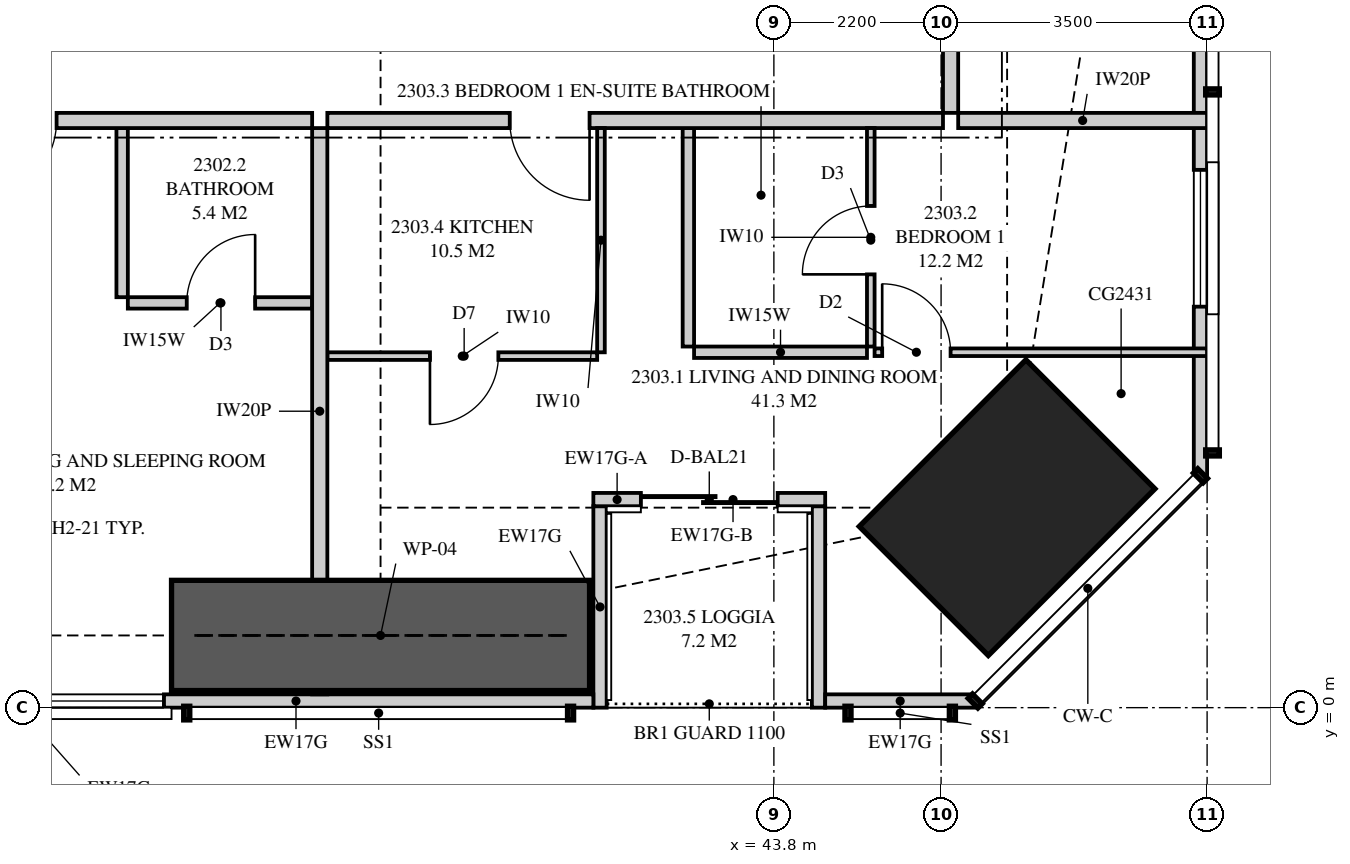
"""IFC4 building model, lengths in metres.
Left out: names, types, materials, properties, quantities, classifications, styles, units other than length and angle.
Written with IfcOpenShell. Run it as: python <this file> out.ifc"""

import sys

from ifc_helpers import new_model, si_unit, direction, frame, frame_2d, origin, origin_2d, place, context, subcontext, project, spatial, polyline, rectangle, hollow_rectangle, outline, extrude, element, fill, save


model = new_model("IFC4")
c1 = context("Model", 3, precision=1e-05, world=origin(), true_north=direction((0.0, 1.0)))
c2 = subcontext(c1, "Body", "Model", "MODEL_VIEW")
j1 = project(units=[si_unit("LENGTHUNIT", "METRE"), si_unit("PLANEANGLEUNIT", "RADIAN")], contexts=[c1])
p1 = place(None, origin())
s1 = spatial("IfcSite", under=j1, at=p1, CompositionType="ELEMENT")
p2 = place(p1, origin())
s2 = spatial("IfcBuilding", under=s1, at=p2, CompositionType="ELEMENT")
p3 = place(p2, frame((0.0, 0.0, 88.1)))
s3 = spatial("IfcBuildingStorey", under=s2, at=p3, CompositionType="ELEMENT", Elevation=88.1)
p4 = place(p3, frame((46.869, 2.631, 0.0), z_axis=(0.0, 0.0, 1.0), x_axis=(-0.707106781187, 0.707106781187, 0.0)))
e1 = element("IfcColumn", 1, at=p4, inside=s3, PredefinedType="COLUMN", context=c2, shape_type="SweptSolid", body=[
    extrude(hollow_rectangle(XDim=2.4, YDim=3.1, WallThickness=0.15, at=origin_2d()), origin(), (0.0, 0.0, 1.0), 3.35),
])
p5 = place(p3, frame((33.6, 0.087, 0.0), z_axis=(0.0, 0.0, 1.0), x_axis=(1.0, 0.0, 0.0)))
e2 = element("IfcWall", 2, at=p5, inside=s3, PredefinedType="SOLIDWALL", context=c2, shape_type="SweptSolid", body=[
    extrude(outline(polyline([(0.0, 0.0), (7.825, 0.0), (7.825, 3.11), (5.228, 3.11), (5.228, 2.15), (5.183, 2.15), (5.183, 3.11), (5.025, 3.11), (5.025, 2.15), (0.0, 2.15), (0.0, 0.0)])), frame((0.0, 0.087, 0.0), z_axis=(0.0, -1.0, 0.0), x_axis=(1.0, 0.0, 0.0)), (0.0, 0.0, 1.0), 0.175),
])
p6 = place(p5, frame((0.375, 0.0, 0.4)))
e3 = element("IfcOpeningElement", 3, at=p6, cuts=e2, PredefinedType="OPENING", context=c2, shape_type="SweptSolid", body=[
    extrude(rectangle(XDim=1.8, YDim=1.7, at=frame_2d((0.9, 0.85))), frame((0.0, 0.097, 0.0), z_axis=(0.0, -1.0, 0.0), x_axis=(1.0, 0.0, 0.0)), (0.0, 0.0, 1.0), 0.195),
])
p7 = place(p3, frame((44.475, 0.087, 0.0), z_axis=(0.0, 0.0, 1.0), x_axis=(1.0, 0.0, 0.0)))
e4 = element("IfcWall", 4, at=p7, inside=s3, PredefinedType="SOLIDWALL", context=c2, shape_type="SweptSolid", body=[
    extrude(rectangle(XDim=1.974, YDim=0.175, at=frame_2d((0.987, 0.0))), origin(), (0.0, 0.0, 1.0), 3.11),
])
p8 = place(p3, frame((41.425, 2.738, 0.0), z_axis=(0.0, 0.0, 1.0), x_axis=(1.0, 0.0, 0.0)))
e5 = element("IfcWall", 5, at=p8, inside=s3, PredefinedType="SOLIDWALL", context=c2, shape_type="SweptSolid", body=[
    extrude(rectangle(XDim=0.625, YDim=0.175, at=frame_2d((0.312, 0.0))), origin(), (0.0, 0.0, 1.0), 2.51),
])
p9 = place(p3, frame((42.05, 2.738, 0.0), z_axis=(0.0, 0.0, 1.0), x_axis=(1.0, 0.0, 0.0)))
e6 = element("IfcWall", 6, at=p9, inside=s3, PredefinedType="SOLIDWALL", context=c2, shape_type="SweptSolid", body=[
    extrude(rectangle(XDim=2.425, YDim=0.175, at=frame_2d((1.212, 0.0))), origin(), (0.0, 0.0, 1.0), 2.15),
])
p10 = place(p9, origin())
e7 = element("IfcOpeningElement", 7, at=p10, cuts=e6, PredefinedType="OPENING", context=c2, shape_type="SweptSolid", body=[
    extrude(rectangle(XDim=1.8, YDim=2.1, at=frame_2d((0.9, 1.05))), frame((0.0, 0.097, 0.0), z_axis=(0.0, -1.0, 0.0), x_axis=(1.0, 0.0, 0.0)), (0.0, 0.0, 1.0), 0.195),
])
p11 = place(p3, frame((41.512, 0.0, 0.0), z_axis=(0.0, 0.0, 1.0), x_axis=(0.0, 1.0, 0.0)))
e8 = element("IfcWall", 8, at=p11, inside=s3, PredefinedType="SOLIDWALL", context=c2, shape_type="SweptSolid", body=[
    extrude(outline(polyline([(0.0, 0.0), (2.65, 0.0), (2.65, 2.51), (2.373, 2.51), (2.373, 2.15), (0.705, 2.15), (0.705, 3.11), (0.0, 3.11), (0.0, 0.0)])), frame((0.0, 0.087, 0.0), z_axis=(0.0, -1.0, 0.0), x_axis=(1.0, 0.0, 0.0)), (0.0, 0.0, 1.0), 0.175),
])
p12 = place(p3, frame((44.387, 0.0, 0.0), z_axis=(0.0, 0.0, 1.0), x_axis=(0.0, 1.0, 0.0)))
e9 = element("IfcWall", 9, at=p12, inside=s3, PredefinedType="SOLIDWALL", context=c2, shape_type="SweptSolid", body=[
    extrude(outline(polyline([(0.0, 0.0), (2.65, 0.0), (2.65, 2.15), (1.291, 2.15), (1.291, 3.11), (0.0, 3.11), (0.0, 0.0)])), frame((0.0, 0.087, 0.0), z_axis=(0.0, -1.0, 0.0), x_axis=(1.0, 0.0, 0.0)), (0.0, 0.0, 1.0), 0.175),
])
p13 = place(p3, frame((49.413, 3.051, 0.0), z_axis=(0.0, 0.0, 1.0), x_axis=(0.0, 1.0, 0.0)))
e10 = element("IfcWall", 10, at=p13, inside=s3, PredefinedType="SOLIDWALL", context=c2, shape_type="SweptSolid", body=[
    extrude(outline(polyline([(0.0, 0.0), (31.897, 0.0), (31.897, 3.11), (22.167, 3.11), (22.167, 2.15), (22.074, 2.15), (22.074, 3.11), (21.949, 3.11), (21.949, 2.15), (9.949, 2.15), (9.949, 3.11), (9.823, 3.11), (9.823, 2.15), (9.73, 2.15), (9.73, 3.11), (0.0, 3.11), (0.0, 0.0)])), frame((0.0, 0.087, 0.0), z_axis=(0.0, -1.0, 0.0), x_axis=(1.0, 0.0, 0.0)), (0.0, 0.0, 1.0), 0.175),
])
p14 = place(p13, frame((2.224, 0.0, 0.4)))
e11 = element("IfcOpeningElement", 11, at=p14, cuts=e10, PredefinedType="OPENING", context=c2, shape_type="SweptSolid", body=[
    extrude(rectangle(XDim=1.8, YDim=1.7, at=frame_2d((0.9, 0.85))), frame((0.0, 0.097, 0.0), z_axis=(0.0, -1.0, 0.0), x_axis=(1.0, 0.0, 0.0)), (0.0, 0.0, 1.0), 0.195),
])
p15 = place(p13, frame((14.849, 0.0, 0.4)))
e12 = element("IfcOpeningElement", 12, at=p15, cuts=e10, PredefinedType="OPENING", context=c2, shape_type="SweptSolid", body=[
    extrude(rectangle(XDim=1.2, YDim=1.7, at=frame_2d((0.6, 0.85))), frame((0.0, 0.097, 0.0), z_axis=(0.0, -1.0, 0.0), x_axis=(1.0, 0.0, 0.0)), (0.0, 0.0, 1.0), 0.195),
])
p16 = place(p13, frame((27.373, 0.0, 0.4)))
e13 = element("IfcOpeningElement", 13, at=p16, cuts=e10, PredefinedType="OPENING", context=c2, shape_type="SweptSolid", body=[
    extrude(rectangle(XDim=1.8, YDim=1.7, at=frame_2d((0.9, 0.85))), frame((0.0, 0.097, 0.0), z_axis=(0.0, -1.0, 0.0), x_axis=(1.0, 0.0, 0.0)), (0.0, 0.0, 1.0), 0.195),
])
p17 = place(p3, frame((37.825, 0.175, 0.0), z_axis=(0.0, 0.0, 1.0), x_axis=(0.0, 1.0, 0.0)))
e14 = element("IfcWall", 14, at=p17, inside=s3, PredefinedType="PARTITIONING", context=c2, shape_type="SweptSolid", body=[
    extrude(outline(polyline([(0.526, 2.15), (0.0, 2.15), (0.0, 0.0), (0.526, 0.0), (0.526, 0.969), (1.024, 0.969), (1.024, 0.0), (7.45, 0.0), (7.45, 3.11), (1.685, 3.11), (1.685, 2.15), (1.024, 2.15), (1.024, 1.18), (0.526, 1.18), (0.526, 2.15)])), frame((0.0, 0.1, 0.0), z_axis=(0.0, -1.0, 0.0), x_axis=(1.0, 0.0, 0.0)), (0.0, 0.0, 1.0), 0.2),
])
p18 = place(p3, frame((29.9, 7.725, 0.0), z_axis=(0.0, 0.0, 1.0), x_axis=(1.0, 0.0, 0.0)))
e15 = element("IfcWall", 15, at=p18, inside=s3, PredefinedType="PARTITIONING", context=c2, shape_type="SweptSolid", body=[
    extrude(rectangle(XDim=7.825, YDim=0.2, at=frame_2d((3.913, 0.0))), origin(), (0.0, 0.0, 1.0), 3.11),
])
p19 = place(p18, frame((3.413, 0.0, 0.0)))
e16 = element("IfcOpeningElement", 16, at=p19, cuts=e15, PredefinedType="OPENING", context=c2, shape_type="SweptSolid", body=[
    extrude(rectangle(XDim=1.05, YDim=2.2, at=frame_2d((0.525, 1.1))), frame((0.0, 0.11, 0.0), z_axis=(0.0, -1.0, 0.0), x_axis=(1.0, 0.0, 0.0)), (0.0, 0.0, 1.0), 0.22),
])
p20 = place(p3, frame((35.3, 5.325, 0.0), z_axis=(0.0, 0.0, 1.0), x_axis=(1.0, 0.0, 0.0)))
e17 = element("IfcWall", 17, at=p20, inside=s3, PredefinedType="PLUMBINGWALL", context=c2, shape_type="SweptSolid", body=[
    extrude(rectangle(XDim=2.425, YDim=0.15, at=frame_2d((1.212, 0.0))), origin(), (0.0, 0.0, 1.0), 3.11),
])
p21 = place(p20, frame((0.775, 0.0, 0.0)))
e18 = element("IfcOpeningElement", 18, at=p21, cuts=e17, PredefinedType="OPENING", context=c2, shape_type="SweptSolid", body=[
    extrude(rectangle(XDim=0.9, YDim=2.1, at=frame_2d((0.45, 1.05))), frame((0.0, 0.085, 0.0), z_axis=(0.0, -1.0, 0.0), x_axis=(1.0, 0.0, 0.0)), (0.0, 0.0, 1.0), 0.17),
])
p22 = place(p3, frame((35.225, 5.4, 0.0), z_axis=(0.0, 0.0, 1.0), x_axis=(0.0, 1.0, 0.0)))
e19 = element("IfcWall", 19, at=p22, inside=s3, PredefinedType="PLUMBINGWALL", context=c2, shape_type="SweptSolid", body=[
    extrude(rectangle(XDim=2.225, YDim=0.15, at=frame_2d((1.113, 0.0))), origin(), (0.0, 0.0, 1.0), 3.11),
])
p23 = place(p3, frame((37.925, 7.725, 0.0), z_axis=(0.0, 0.0, 1.0), x_axis=(1.0, 0.0, 0.0)))
e20 = element("IfcWall", 20, at=p23, inside=s3, PredefinedType="PARTITIONING", context=c2, shape_type="SweptSolid", body=[
    extrude(outline(polyline([(0.0, 0.0), (8.1, 0.0), (8.1, 3.11), (1.046, 3.11), (1.046, 2.531), (0.354, 2.531), (0.354, 3.11), (0.0, 3.11), (0.0, 0.0)])), frame((0.0, 0.1, 0.0), z_axis=(0.0, -1.0, 0.0), x_axis=(1.0, 0.0, 0.0)), (0.0, 0.0, 1.0), 0.2),
])
p24 = place(p23, frame((2.4, 0.0, 0.0)))
e21 = element("IfcOpeningElement", 21, at=p24, cuts=e20, PredefinedType="OPENING", context=c2, shape_type="SweptSolid", body=[
    extrude(rectangle(XDim=1.05, YDim=2.2, at=frame_2d((0.525, 1.1))), frame((0.0, 0.11, 0.0), z_axis=(0.0, -1.0, 0.0), x_axis=(1.0, 0.0, 0.0)), (0.0, 0.0, 1.0), 0.22),
])
p25 = place(p3, frame((45.075, 4.751, 0.0), z_axis=(0.0, 0.0, 1.0), x_axis=(0.0, 1.0, 0.0)))
e22 = element("IfcWall", 22, at=p25, inside=s3, PredefinedType="PARTITIONING", context=c2, shape_type="SweptSolid", body=[
    extrude(rectangle(XDim=2.874, YDim=0.1, at=frame_2d((1.437, 0.0))), origin(), (0.0, 0.0, 1.0), 3.11),
])
p26 = place(p25, frame((0.949, 0.0, 0.0)))
e23 = element("IfcOpeningElement", 23, at=p26, cuts=e22, PredefinedType="OPENING", context=c2, shape_type="SweptSolid", body=[
    extrude(rectangle(XDim=0.9, YDim=2.1, at=frame_2d((0.45, 1.05))), frame((0.0, 0.06, 0.0), z_axis=(0.0, -1.0, 0.0), x_axis=(1.0, 0.0, 0.0)), (0.0, 0.0, 1.0), 0.12),
])
p27 = place(p3, frame((45.125, 4.676, 0.0), z_axis=(0.0, 0.0, 1.0), x_axis=(1.0, 0.0, 0.0)))
e24 = element("IfcWall", 24, at=p27, inside=s3, PredefinedType="PARTITIONING", context=c2, shape_type="SweptSolid", body=[
    extrude(outline(polyline([(0.0, 0.0), (4.375, 0.0), (4.375, 3.11), (2.946, 3.11), (2.946, 2.15), (1.204, 2.15), (1.204, 3.11), (0.0, 3.11), (0.0, 0.0)])), frame((0.0, 0.05, 0.0), z_axis=(0.0, -1.0, 0.0), x_axis=(1.0, 0.0, 0.0)), (0.0, 0.0, 1.0), 0.1),
])
p28 = place(p27, frame((0.1, 0.0, 0.0)))
e25 = element("IfcOpeningElement", 25, at=p28, cuts=e24, PredefinedType="OPENING", context=c2, shape_type="SweptSolid", body=[
    extrude(rectangle(XDim=0.9, YDim=2.1, at=frame_2d((0.45, 1.05))), frame((0.0, 0.06, 0.0), z_axis=(0.0, -1.0, 0.0), x_axis=(1.0, 0.0, 0.0)), (0.0, 0.0, 1.0), 0.12),
])
p29 = place(p3, frame((42.75, 4.676, 0.0), z_axis=(0.0, 0.0, 1.0), x_axis=(1.0, 0.0, 0.0)))
e26 = element("IfcWall", 26, at=p29, inside=s3, PredefinedType="PLUMBINGWALL", context=c2, shape_type="SweptSolid", body=[
    extrude(rectangle(XDim=2.275, YDim=0.15, at=frame_2d((1.137, 0.0))), origin(), (0.0, 0.0, 1.0), 3.11),
])
p30 = place(p3, frame((42.675, 4.751, 0.0), z_axis=(0.0, 0.0, 1.0), x_axis=(0.0, 1.0, 0.0)))
e27 = element("IfcWall", 27, at=p30, inside=s3, PredefinedType="PLUMBINGWALL", context=c2, shape_type="SweptSolid", body=[
    extrude(rectangle(XDim=2.874, YDim=0.15, at=frame_2d((1.437, 0.0))), origin(), (0.0, 0.0, 1.0), 3.11),
])
p31 = place(p3, frame((37.925, 4.625, 0.0), z_axis=(0.0, 0.0, 1.0), x_axis=(1.0, 0.0, 0.0)))
e28 = element("IfcWall", 28, at=p31, inside=s3, PredefinedType="PARTITIONING", context=c2, shape_type="SweptSolid", body=[
    extrude(outline(polyline([(0.0, 0.0), (3.55, 0.0), (3.55, 3.11), (0.996, 3.11), (0.996, 2.531), (0.404, 2.531), (0.404, 3.11), (0.0, 3.11), (0.0, 0.0)])), frame((0.0, 0.05, 0.0), z_axis=(0.0, -1.0, 0.0), x_axis=(1.0, 0.0, 0.0)), (0.0, 0.0, 1.0), 0.1),
])
p32 = place(p31, frame((1.35, 0.0, 0.0)))
e29 = element("IfcOpeningElement", 29, at=p32, cuts=e28, PredefinedType="OPENING", context=c2, shape_type="SweptSolid", body=[
    extrude(rectangle(XDim=0.9, YDim=2.1, at=frame_2d((0.45, 1.05))), frame((0.0, 0.06, 0.0), z_axis=(0.0, -1.0, 0.0), x_axis=(1.0, 0.0, 0.0)), (0.0, 0.0, 1.0), 0.12),
])
p33 = place(p3, frame((41.525, 4.675, 0.0), z_axis=(0.0, 0.0, 1.0), x_axis=(0.0, 1.0, 0.0)))
e30 = element("IfcWall", 30, at=p33, inside=s3, PredefinedType="PARTITIONING", context=c2, shape_type="SweptSolid", body=[
    extrude(rectangle(XDim=2.95, YDim=0.1, at=frame_2d((1.475, 0.0))), origin(), (0.0, 0.0, 1.0), 3.11),
])
p34 = place(p3, frame((46.225, 7.725, 0.0), z_axis=(0.0, 0.0, 1.0), x_axis=(1.0, 0.0, 0.0)))
e31 = element("IfcWall", 31, at=p34, inside=s3, PredefinedType="PARTITIONING", context=c2, shape_type="SweptSolid", body=[
    extrude(outline(polyline([(0.0, 0.0), (3.275, 0.0), (3.275, 3.11), (2.392, 3.11), (2.392, 2.15), (0.643, 2.15), (0.643, 2.531), (0.297, 2.531), (0.297, 3.11), (0.0, 3.11), (0.0, 0.0)])), frame((0.0, 0.1, 0.0), z_axis=(0.0, -1.0, 0.0), x_axis=(1.0, 0.0, 0.0)), (0.0, 0.0, 1.0), 0.2),
])
p35 = place(p3, frame((46.125, 7.825, 0.0), z_axis=(0.0, 0.0, 1.0), x_axis=(0.0, 1.0, 0.0)))
e32 = element("IfcWall", 32, at=p35, inside=s3, PredefinedType="PARTITIONING", context=c2, shape_type="SweptSolid", body=[
    extrude(outline(polyline([(0.0, 0.0), (8.475, 0.0), (8.475, 3.11), (5.521, 3.11), (5.521, 2.531), (4.829, 2.531), (4.829, 3.11), (0.0, 3.11), (0.0, 0.0)])), frame((0.0, 0.1, 0.0), z_axis=(0.0, -1.0, 0.0), x_axis=(1.0, 0.0, 0.0)), (0.0, 0.0, 1.0), 0.2),
])
p36 = place(p3, frame((35.875, 0.95, 0.0), z_axis=(0.0, 0.0, 1.0), x_axis=(1.0, 0.0, 0.0)))
e33 = element("IfcWall", 33, at=p36, inside=s3, PredefinedType="SHEAR", context=c2, shape_type="SweptSolid", body=[
    extrude(rectangle(XDim=5.5, YDim=1.45, at=frame_2d((2.75, 0.0))), origin(), (0.0, 0.0, 1.0), 3.35),
])
p37 = place(p6, origin())
e34 = element("IfcWindow", 34, at=p37, inside=s3, PartitioningType="SINGLE_PANEL", PredefinedType="WINDOW", context=c2, shape_type="SweptSolid", body=[
    extrude(rectangle(XDim=1.8, YDim=1.7, at=frame_2d((0.9, 0.85))), frame((0.0, 0.03, 0.0), z_axis=(0.0, -1.0, 0.0), x_axis=(1.0, 0.0, 0.0)), (0.0, 0.0, 1.0), 0.06),
])
fill(e3, e34)
p38 = place(p10, origin())
e35 = element("IfcDoor", 35, at=p38, inside=s3, OperationType="SLIDING_TO_LEFT", PredefinedType="DOOR", context=c2, shape_type="SweptSolid", body=[
    extrude(rectangle(XDim=1.8, YDim=2.1, at=frame_2d((0.9, 1.05))), frame((0.0, 0.025, 0.0), z_axis=(0.0, -1.0, 0.0), x_axis=(1.0, 0.0, 0.0)), (0.0, 0.0, 1.0), 0.05),
])
fill(e7, e35)
p39 = place(p14, origin())
e36 = element("IfcWindow", 36, at=p39, inside=s3, PartitioningType="SINGLE_PANEL", PredefinedType="WINDOW", context=c2, shape_type="SweptSolid", body=[
    extrude(rectangle(XDim=1.8, YDim=1.7, at=frame_2d((0.9, 0.85))), frame((0.0, 0.03, 0.0), z_axis=(0.0, -1.0, 0.0), x_axis=(1.0, 0.0, 0.0)), (0.0, 0.0, 1.0), 0.06),
])
fill(e11, e36)
p40 = place(p19, frame((1.05, 0.0, 0.0), z_axis=(0.0, 0.0, 1.0), x_axis=(-1.0, 0.0, 0.0)))
e37 = element("IfcDoor", 37, at=p40, inside=s3, OperationType="SINGLE_SWING_RIGHT", PredefinedType="DOOR", context=c2, shape_type="SweptSolid", body=[
    extrude(rectangle(XDim=1.05, YDim=2.2, at=frame_2d((0.525, 1.1))), frame((0.0, 0.025, 0.0), z_axis=(0.0, -1.0, 0.0), x_axis=(1.0, 0.0, 0.0)), (0.0, 0.0, 1.0), 0.05),
])
fill(e16, e37)
p41 = place(p21, origin())
e38 = element("IfcDoor", 38, at=p41, inside=s3, OperationType="SINGLE_SWING_RIGHT", PredefinedType="DOOR", context=c2, shape_type="SweptSolid", body=[
    extrude(rectangle(XDim=0.9, YDim=2.1, at=frame_2d((0.45, 1.05))), frame((0.0, 0.025, 0.0), z_axis=(0.0, -1.0, 0.0), x_axis=(1.0, 0.0, 0.0)), (0.0, 0.0, 1.0), 0.05),
])
fill(e18, e38)
p42 = place(p24, frame((1.05, 0.0, 0.0), z_axis=(0.0, 0.0, 1.0), x_axis=(-1.0, 0.0, 0.0)))
e39 = element("IfcDoor", 39, at=p42, inside=s3, OperationType="SINGLE_SWING_LEFT", PredefinedType="DOOR", context=c2, shape_type="SweptSolid", body=[
    extrude(rectangle(XDim=1.05, YDim=2.2, at=frame_2d((0.525, 1.1))), frame((0.0, 0.025, 0.0), z_axis=(0.0, -1.0, 0.0), x_axis=(1.0, 0.0, 0.0)), (0.0, 0.0, 1.0), 0.05),
])
fill(e21, e39)
p43 = place(p28, origin())
e40 = element("IfcDoor", 40, at=p43, inside=s3, OperationType="SINGLE_SWING_LEFT", PredefinedType="DOOR", context=c2, shape_type="SweptSolid", body=[
    extrude(rectangle(XDim=0.9, YDim=2.1, at=frame_2d((0.45, 1.05))), frame((0.0, 0.025, 0.0), z_axis=(0.0, -1.0, 0.0), x_axis=(1.0, 0.0, 0.0)), (0.0, 0.0, 1.0), 0.05),
])
fill(e25, e40)
p44 = place(p26, origin())
e41 = element("IfcDoor", 41, at=p44, inside=s3, OperationType="SINGLE_SWING_LEFT", PredefinedType="DOOR", context=c2, shape_type="SweptSolid", body=[
    extrude(rectangle(XDim=0.9, YDim=2.1, at=frame_2d((0.45, 1.05))), frame((0.0, 0.025, 0.0), z_axis=(0.0, -1.0, 0.0), x_axis=(1.0, 0.0, 0.0)), (0.0, 0.0, 1.0), 0.05),
])
fill(e23, e41)
p45 = place(p32, frame((0.9, 0.0, 0.0), z_axis=(0.0, 0.0, 1.0), x_axis=(-1.0, 0.0, 0.0)))
e42 = element("IfcDoor", 42, at=p45, inside=s3, OperationType="SINGLE_SWING_RIGHT", PredefinedType="DOOR", context=c2, shape_type="SweptSolid", body=[
    extrude(rectangle(XDim=0.9, YDim=2.1, at=frame_2d((0.45, 1.05))), frame((0.0, 0.025, 0.0), z_axis=(0.0, -1.0, 0.0), x_axis=(1.0, 0.0, 0.0)), (0.0, 0.0, 1.0), 0.05),
])
fill(e29, e42)
save(model, sys.argv[1])
